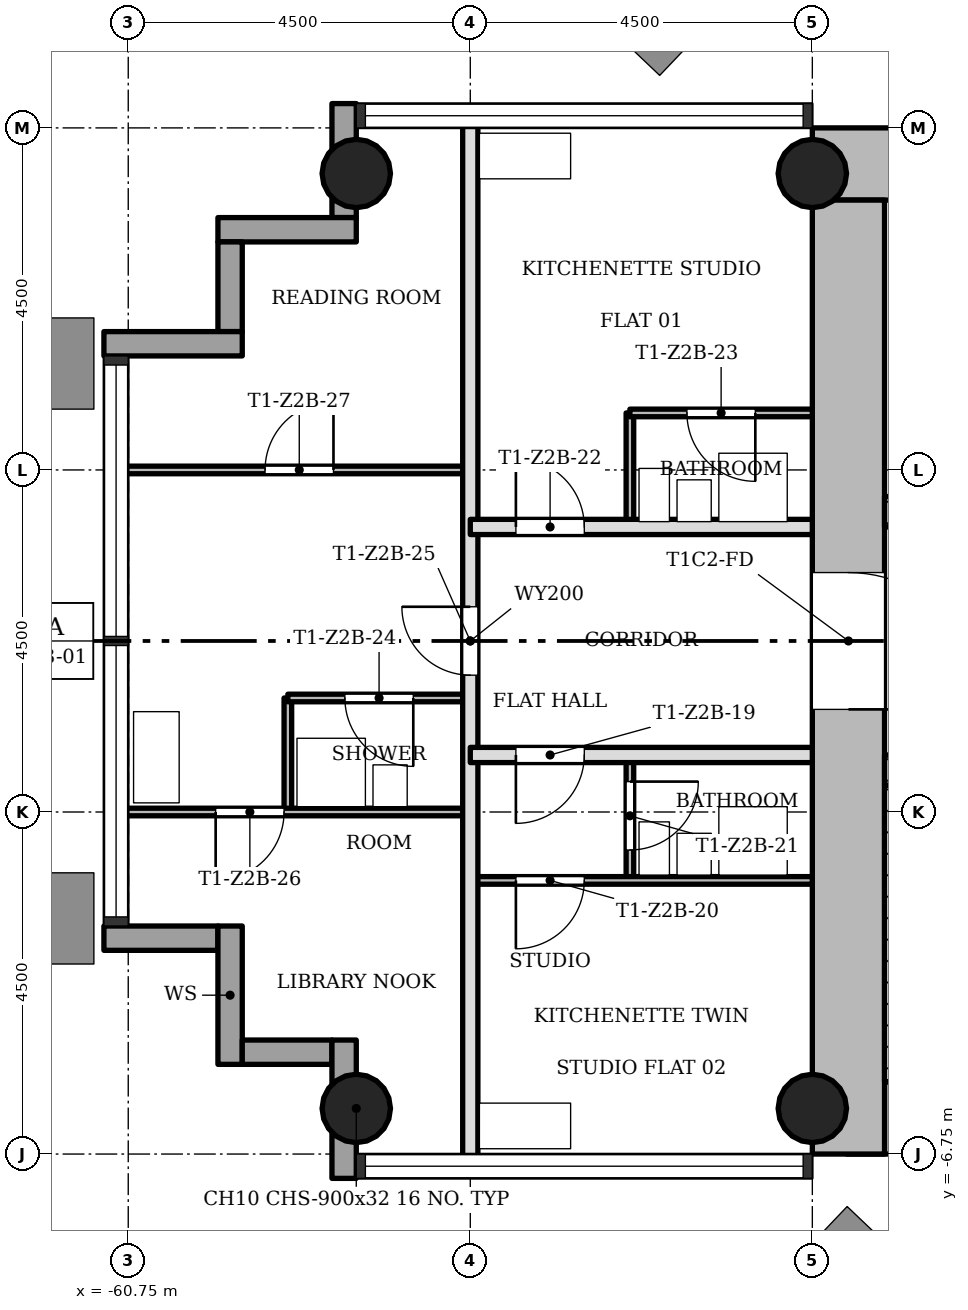
"""IFC4 building model, lengths in metres.
Left out: names, types, materials, properties, quantities, classifications, styles, units other than length and angle.
Written with IfcOpenShell. Run it as: python <this file> out.ifc"""

import sys

from ifc_helpers import new_model, si_unit, direction, frame, frame_2d, origin, origin_2d, place, context, subcontext, project, spatial, rectangle, hollow_circle, extrude, element, fill, save


model = new_model("IFC4")
c1 = context("Model", 3, precision=1e-05, world=origin(), true_north=direction((0.0, 1.0)))
c2 = subcontext(c1, "Body", "Model", "MODEL_VIEW")
j1 = project(units=[si_unit("LENGTHUNIT", "METRE"), si_unit("PLANEANGLEUNIT", "RADIAN")], contexts=[c1])
p1 = place(None, origin())
s1 = spatial("IfcSite", under=j1, at=p1, CompositionType="ELEMENT")
p2 = place(p1, origin())
s2 = spatial("IfcBuilding", under=s1, at=p2, CompositionType="ELEMENT")
p3 = place(p2, frame((0.0, 0.0, 80.0)))
s3 = spatial("IfcBuildingStorey", under=s2, at=p3, CompositionType="ELEMENT", Elevation=80.0)
p4 = place(p3, frame((-51.298, -6.275, 0.0), z_axis=(0.0, 0.0, 1.0), x_axis=(1.0, 0.0, 0.0)))
e1 = element("IfcWall", 1, at=p4, inside=s3, PredefinedType="SHEAR", context=c2, shape_type="SweptSolid", body=[
    extrude(rectangle(XDim=8.696, YDim=0.95, at=frame_2d((4.348, 0.0))), origin(), (0.0, 0.0, 1.0), 3.4),
])
p5 = place(p3, frame((-43.7, 6.275, 0.0), z_axis=(0.0, 0.0, 1.0), x_axis=(-1.0, 0.0, 0.0)))
e2 = element("IfcWall", 2, at=p5, inside=s3, PredefinedType="SHEAR", context=c2, shape_type="SweptSolid", body=[
    extrude(rectangle(XDim=8.05, YDim=0.95, at=frame_2d((4.025, 0.0))), origin(), (0.0, 0.0, 1.0), 3.4),
])
p6 = place(p3, frame((-51.275, 5.8, 0.0), z_axis=(0.0, 0.0, 1.0), x_axis=(0.0, -1.0, 0.0)))
e3 = element("IfcWall", 3, at=p6, inside=s3, PredefinedType="SHEAR", context=c2, shape_type="SweptSolid", body=[
    extrude(rectangle(XDim=12.55, YDim=0.95, at=frame_2d((6.275, 0.0))), origin(), (0.0, 0.0, 1.0), 3.4),
])
p7 = place(p6, frame((4.9, 0.0, 0.0)))
e4 = element("IfcOpeningElement", 4, at=p7, cuts=e3, PredefinedType="OPENING", context=c2, shape_type="SweptSolid", body=[
    extrude(rectangle(XDim=1.8, YDim=2.1, at=frame_2d((0.9, 1.05))), frame((0.0, 0.485, 0.0), z_axis=(0.0, -1.0, 0.0), x_axis=(1.0, 0.0, 0.0)), (0.0, 0.0, 1.0), 0.97),
])
p8 = place(p3, frame((-50.8, -1.7, 0.0), z_axis=(0.0, 0.0, 1.0), x_axis=(1.0, 0.0, 0.0)))
e5 = element("IfcWall", 5, at=p8, inside=s3, PredefinedType="SHEAR", context=c2, shape_type="SweptSolid", body=[
    extrude(rectangle(XDim=7.1, YDim=0.4, at=frame_2d((3.55, 0.0))), origin(), (0.0, 0.0, 1.0), 3.4),
])
p9 = place(p8, frame((5.5, 0.0, 0.0)))
e6 = element("IfcOpeningElement", 6, at=p9, cuts=e5, PredefinedType="OPENING", context=c2, shape_type="SweptSolid", body=[
    extrude(rectangle(XDim=0.9, YDim=2.1, at=frame_2d((0.45, 1.05))), frame((0.0, 0.21, 0.0), z_axis=(0.0, -1.0, 0.0), x_axis=(1.0, 0.0, 0.0)), (0.0, 0.0, 1.0), 0.42),
])
p10 = place(p3, frame((-50.8, 1.7, 0.0), z_axis=(0.0, 0.0, 1.0), x_axis=(1.0, 0.0, 0.0)))
e7 = element("IfcWall", 7, at=p10, inside=s3, PredefinedType="SHEAR", context=c2, shape_type="SweptSolid", body=[
    extrude(rectangle(XDim=7.1, YDim=0.4, at=frame_2d((3.55, 0.0))), origin(), (0.0, 0.0, 1.0), 3.4),
])
p11 = place(p10, frame((5.2, 0.0, 0.0)))
e8 = element("IfcOpeningElement", 8, at=p11, cuts=e7, PredefinedType="OPENING", context=c2, shape_type="SweptSolid", body=[
    extrude(rectangle(XDim=1.1, YDim=2.1, at=frame_2d((0.55, 1.05))), frame((0.0, 0.21, 0.0), z_axis=(0.0, -1.0, 0.0), x_axis=(1.0, 0.0, 0.0)), (0.0, 0.0, 1.0), 0.42),
])
for number, where, z_axis, x_axis in (
    (9, (-51.75, -6.15, 0.0), (0.0, 0.0, 1.0), (1.0, 0.0, 0.0)),
    (10, (-51.75, 6.15, 0.0), (0.0, 0.0, 1.0), (1.0, 0.0, 0.0)),
    (11, (-57.75, -6.15, 0.0), (0.0, 0.0, 1.0), (1.0, 0.0, 0.0)),
    (12, (-57.75, 6.15, 0.0), (0.0, 0.0, 1.0), (1.0, 0.0, 0.0)),
):
    element("IfcColumn", number, at=place(p3, frame(where, z_axis=z_axis, x_axis=x_axis)), inside=s3, PredefinedType="COLUMN", context=c2, shape_type="SweptSolid", body=[
        extrude(hollow_circle(Radius=0.45, WallThickness=0.032, at=origin_2d()), origin(), (0.0, 0.0, 1.0), 3.4),
    ])
p12 = place(p3, frame((-61.07, -3.91, -0.3), z_axis=(0.0, 0.0, 1.0), x_axis=(1.0, 0.0, 0.0)))
e13 = element("IfcWall", 13, at=p12, inside=s3, PredefinedType="STANDARD", context=c2, shape_type="SweptSolid", body=[
    extrude(rectangle(XDim=1.5, YDim=0.32, at=frame_2d((0.75, 0.0))), origin(), (0.0, 0.0, 1.0), 3.4),
])
p13 = place(p3, frame((-59.41, -3.75, -0.3), z_axis=(0.0, 0.0, 1.0), x_axis=(0.0, -1.0, 0.0)))
e14 = element("IfcWall", 14, at=p13, inside=s3, PredefinedType="STANDARD", context=c2, shape_type="SweptSolid", body=[
    extrude(rectangle(XDim=1.82, YDim=0.32, at=frame_2d((0.91, 0.0))), origin(), (0.0, 0.0, 1.0), 3.4),
])
p14 = place(p3, frame((-59.25, -5.41, -0.3), z_axis=(0.0, 0.0, 1.0), x_axis=(1.0, 0.0, 0.0)))
e15 = element("IfcWall", 15, at=p14, inside=s3, PredefinedType="STANDARD", context=c2, shape_type="SweptSolid", body=[
    extrude(rectangle(XDim=1.18, YDim=0.32, at=frame_2d((0.59, 0.0))), origin(), (0.0, 0.0, 1.0), 3.4),
])
p15 = place(p3, frame((-57.91, -5.25, -0.3), z_axis=(0.0, 0.0, 1.0), x_axis=(0.0, -1.0, 0.0)))
e16 = element("IfcWall", 16, at=p15, inside=s3, PredefinedType="STANDARD", context=c2, shape_type="SweptSolid", body=[
    extrude(rectangle(XDim=1.82, YDim=0.32, at=frame_2d((0.91, 0.0))), origin(), (0.0, 0.0, 1.0), 3.4),
])
p16 = place(p3, frame((-57.91, 7.07, -0.3), z_axis=(0.0, 0.0, 1.0), x_axis=(0.0, -1.0, 0.0)))
e17 = element("IfcWall", 17, at=p16, inside=s3, PredefinedType="STANDARD", context=c2, shape_type="SweptSolid", body=[
    extrude(rectangle(XDim=1.5, YDim=0.32, at=frame_2d((0.75, 0.0))), origin(), (0.0, 0.0, 1.0), 3.4),
])
p17 = place(p3, frame((-57.75, 5.41, -0.3), z_axis=(0.0, 0.0, 1.0), x_axis=(-1.0, 0.0, 0.0)))
e18 = element("IfcWall", 18, at=p17, inside=s3, PredefinedType="STANDARD", context=c2, shape_type="SweptSolid", body=[
    extrude(rectangle(XDim=1.82, YDim=0.32, at=frame_2d((0.91, 0.0))), origin(), (0.0, 0.0, 1.0), 3.4),
])
p18 = place(p3, frame((-59.41, 5.25, -0.3), z_axis=(0.0, 0.0, 1.0), x_axis=(0.0, -1.0, 0.0)))
e19 = element("IfcWall", 19, at=p18, inside=s3, PredefinedType="STANDARD", context=c2, shape_type="SweptSolid", body=[
    extrude(rectangle(XDim=1.18, YDim=0.32, at=frame_2d((0.59, 0.0))), origin(), (0.0, 0.0, 1.0), 3.4),
])
p19 = place(p3, frame((-59.25, 3.91, -0.3), z_axis=(0.0, 0.0, 1.0), x_axis=(-1.0, 0.0, 0.0)))
e20 = element("IfcWall", 20, at=p19, inside=s3, PredefinedType="STANDARD", context=c2, shape_type="SweptSolid", body=[
    extrude(rectangle(XDim=1.82, YDim=0.32, at=frame_2d((0.91, 0.0))), origin(), (0.0, 0.0, 1.0), 3.4),
])
p20 = place(p3, frame((-58.65, -2.25, 0.0), z_axis=(0.0, 0.0, 1.0), x_axis=(0.0, 1.0, 0.0)))
e21 = element("IfcWall", 21, at=p20, inside=s3, PredefinedType="PARTITIONING", context=c2, shape_type="SweptSolid", body=[
    extrude(rectangle(XDim=1.5, YDim=0.1, at=frame_2d((0.75, 0.0))), origin(), (0.0, 0.0, 1.0), 3.0),
])
p21 = place(p3, frame((-56.25, -6.85, 0.0), z_axis=(0.0, 0.0, 1.0), x_axis=(0.0, 1.0, 0.0)))
e22 = element("IfcWall", 22, at=p21, inside=s3, PredefinedType="SOLIDWALL", context=c2, shape_type="SweptSolid", body=[
    extrude(rectangle(XDim=13.7, YDim=0.2, at=frame_2d((6.85, 0.0))), origin(), (0.0, 0.0, 1.0), 3.0),
])
p22 = place(p21, frame((6.4, 0.0, 0.0)))
e23 = element("IfcOpeningElement", 23, at=p22, cuts=e22, PredefinedType="OPENING", context=c2, shape_type="SweptSolid", body=[
    extrude(rectangle(XDim=0.9, YDim=2.1, at=frame_2d((0.45, 1.05))), frame((0.0, 0.11, 0.0), z_axis=(0.0, -1.0, 0.0), x_axis=(1.0, 0.0, 0.0)), (0.0, 0.0, 1.0), 0.22),
])
p23 = place(p3, frame((-54.15, -3.15, 0.0), z_axis=(0.0, 0.0, 1.0), x_axis=(0.0, 1.0, 0.0)))
e24 = element("IfcWall", 24, at=p23, inside=s3, PredefinedType="PARTITIONING", context=c2, shape_type="SweptSolid", body=[
    extrude(rectangle(XDim=1.65, YDim=0.1, at=frame_2d((0.825, 0.0))), origin(), (0.0, 0.0, 1.0), 3.0),
])
p24 = place(p23, frame((0.4, 0.0, 0.0)))
e25 = element("IfcOpeningElement", 25, at=p24, cuts=e24, PredefinedType="OPENING", context=c2, shape_type="SweptSolid", body=[
    extrude(rectangle(XDim=0.9, YDim=2.1, at=frame_2d((0.45, 1.05))), frame((0.0, 0.06, 0.0), z_axis=(0.0, -1.0, 0.0), x_axis=(1.0, 0.0, 0.0)), (0.0, 0.0, 1.0), 0.12),
])
p25 = place(p3, frame((-54.15, 1.5, 0.0), z_axis=(0.0, 0.0, 1.0), x_axis=(0.0, 1.0, 0.0)))
e26 = element("IfcWall", 26, at=p25, inside=s3, PredefinedType="PARTITIONING", context=c2, shape_type="SweptSolid", body=[
    extrude(rectangle(XDim=1.5, YDim=0.1, at=frame_2d((0.75, 0.0))), origin(), (0.0, 0.0, 1.0), 3.0),
])
p26 = place(p3, frame((-56.25, -3.15, 0.0), z_axis=(0.0, 0.0, 1.0), x_axis=(1.0, 0.0, 0.0)))
e27 = element("IfcWall", 27, at=p26, inside=s3, PredefinedType="PARTITIONING", context=c2, shape_type="SweptSolid", body=[
    extrude(rectangle(XDim=4.5, YDim=0.1, at=frame_2d((2.25, 0.0))), origin(), (0.0, 0.0, 1.0), 3.0),
])
p27 = place(p26, frame((0.6, 0.0, 0.0)))
e28 = element("IfcOpeningElement", 28, at=p27, cuts=e27, PredefinedType="OPENING", context=c2, shape_type="SweptSolid", body=[
    extrude(rectangle(XDim=0.9, YDim=2.1, at=frame_2d((0.45, 1.05))), frame((0.0, 0.06, 0.0), z_axis=(0.0, -1.0, 0.0), x_axis=(1.0, 0.0, 0.0)), (0.0, 0.0, 1.0), 0.12),
])
p28 = place(p3, frame((-60.85, -2.25, 0.0), z_axis=(0.0, 0.0, 1.0), x_axis=(1.0, 0.0, 0.0)))
e29 = element("IfcWall", 29, at=p28, inside=s3, PredefinedType="PARTITIONING", context=c2, shape_type="SweptSolid", body=[
    extrude(rectangle(XDim=4.6, YDim=0.1, at=frame_2d((2.3, 0.0))), origin(), (0.0, 0.0, 1.0), 3.0),
])
p29 = place(p28, frame((1.25, 0.0, 0.0)))
e30 = element("IfcOpeningElement", 30, at=p29, cuts=e29, PredefinedType="OPENING", context=c2, shape_type="SweptSolid", body=[
    extrude(rectangle(XDim=0.9, YDim=2.1, at=frame_2d((0.45, 1.05))), frame((0.0, 0.06, 0.0), z_axis=(0.0, -1.0, 0.0), x_axis=(1.0, 0.0, 0.0)), (0.0, 0.0, 1.0), 0.12),
])
p30 = place(p3, frame((-56.25, -1.5, 0.0), z_axis=(0.0, 0.0, 1.0), x_axis=(1.0, 0.0, 0.0)))
e31 = element("IfcWall", 31, at=p30, inside=s3, PredefinedType="SOLIDWALL", context=c2, shape_type="SweptSolid", body=[
    extrude(rectangle(XDim=4.5, YDim=0.2, at=frame_2d((2.25, 0.0))), origin(), (0.0, 0.0, 1.0), 3.0),
])
p31 = place(p30, frame((0.6, 0.0, 0.0)))
e32 = element("IfcOpeningElement", 32, at=p31, cuts=e31, PredefinedType="OPENING", context=c2, shape_type="SweptSolid", body=[
    extrude(rectangle(XDim=0.9, YDim=2.1, at=frame_2d((0.45, 1.05))), frame((0.0, 0.11, 0.0), z_axis=(0.0, -1.0, 0.0), x_axis=(1.0, 0.0, 0.0)), (0.0, 0.0, 1.0), 0.22),
])
p32 = place(p3, frame((-58.65, -0.75, 0.0), z_axis=(0.0, 0.0, 1.0), x_axis=(1.0, 0.0, 0.0)))
e33 = element("IfcWall", 33, at=p32, inside=s3, PredefinedType="PARTITIONING", context=c2, shape_type="SweptSolid", body=[
    extrude(rectangle(XDim=2.4, YDim=0.1, at=frame_2d((1.2, 0.0))), origin(), (0.0, 0.0, 1.0), 3.0),
])
p33 = place(p32, frame((0.75, 0.0, 0.0)))
e34 = element("IfcOpeningElement", 34, at=p33, cuts=e33, PredefinedType="OPENING", context=c2, shape_type="SweptSolid", body=[
    extrude(rectangle(XDim=0.9, YDim=2.1, at=frame_2d((0.45, 1.05))), frame((0.0, 0.06, 0.0), z_axis=(0.0, -1.0, 0.0), x_axis=(1.0, 0.0, 0.0)), (0.0, 0.0, 1.0), 0.12),
])
p34 = place(p3, frame((-56.25, 1.5, 0.0), z_axis=(0.0, 0.0, 1.0), x_axis=(1.0, 0.0, 0.0)))
e35 = element("IfcWall", 35, at=p34, inside=s3, PredefinedType="SOLIDWALL", context=c2, shape_type="SweptSolid", body=[
    extrude(rectangle(XDim=4.5, YDim=0.2, at=frame_2d((2.25, 0.0))), origin(), (0.0, 0.0, 1.0), 3.0),
])
p35 = place(p34, frame((0.6, 0.0, 0.0)))
e36 = element("IfcOpeningElement", 36, at=p35, cuts=e35, PredefinedType="OPENING", context=c2, shape_type="SweptSolid", body=[
    extrude(rectangle(XDim=0.9, YDim=2.1, at=frame_2d((0.45, 1.05))), frame((0.0, 0.11, 0.0), z_axis=(0.0, -1.0, 0.0), x_axis=(1.0, 0.0, 0.0)), (0.0, 0.0, 1.0), 0.22),
])
p36 = place(p3, frame((-60.85, 2.25, 0.0), z_axis=(0.0, 0.0, 1.0), x_axis=(1.0, 0.0, 0.0)))
e37 = element("IfcWall", 37, at=p36, inside=s3, PredefinedType="PARTITIONING", context=c2, shape_type="SweptSolid", body=[
    extrude(rectangle(XDim=4.6, YDim=0.1, at=frame_2d((2.3, 0.0))), origin(), (0.0, 0.0, 1.0), 3.0),
])
p37 = place(p36, frame((1.9, 0.0, 0.0)))
e38 = element("IfcOpeningElement", 38, at=p37, cuts=e37, PredefinedType="OPENING", context=c2, shape_type="SweptSolid", body=[
    extrude(rectangle(XDim=0.9, YDim=2.1, at=frame_2d((0.45, 1.05))), frame((0.0, 0.06, 0.0), z_axis=(0.0, -1.0, 0.0), x_axis=(1.0, 0.0, 0.0)), (0.0, 0.0, 1.0), 0.12),
])
p38 = place(p3, frame((-54.15, 3.0, 0.0), z_axis=(0.0, 0.0, 1.0), x_axis=(1.0, 0.0, 0.0)))
e39 = element("IfcWall", 39, at=p38, inside=s3, PredefinedType="PARTITIONING", context=c2, shape_type="SweptSolid", body=[
    extrude(rectangle(XDim=2.4, YDim=0.1, at=frame_2d((1.2, 0.0))), origin(), (0.0, 0.0, 1.0), 3.0),
])
p39 = place(p38, frame((0.75, 0.0, 0.0)))
e40 = element("IfcOpeningElement", 40, at=p39, cuts=e39, PredefinedType="OPENING", context=c2, shape_type="SweptSolid", body=[
    extrude(rectangle(XDim=0.9, YDim=2.1, at=frame_2d((0.45, 1.05))), frame((0.0, 0.06, 0.0), z_axis=(0.0, -1.0, 0.0), x_axis=(1.0, 0.0, 0.0)), (0.0, 0.0, 1.0), 0.12),
])
p40 = place(p3, frame((-50.675, -1.9, 0.0), z_axis=(0.0, 0.0, 1.0), x_axis=(0.0, -1.0, 0.0)))
e41 = element("IfcWall", 41, at=p40, inside=s3, PredefinedType="SHEAR", context=c2, shape_type="SweptSolid", body=[
    extrude(rectangle(XDim=3.9, YDim=0.25, at=frame_2d((1.95, 0.0))), origin(), (0.0, 0.0, 1.0), 3.4),
])
p41 = place(p31, origin())
e42 = element("IfcDoor", 42, at=p41, inside=s3, OperationType="SINGLE_SWING_LEFT", PredefinedType="DOOR", context=c2, shape_type="SweptSolid", body=[
    extrude(rectangle(XDim=0.9, YDim=2.1, at=frame_2d((0.45, 1.05))), frame((0.0, 0.025, 0.0), z_axis=(0.0, -1.0, 0.0), x_axis=(1.0, 0.0, 0.0)), (0.0, 0.0, 1.0), 0.05),
])
fill(e32, e42)
p42 = place(p27, origin())
e43 = element("IfcDoor", 43, at=p42, inside=s3, OperationType="SINGLE_SWING_LEFT", PredefinedType="DOOR", context=c2, shape_type="SweptSolid", body=[
    extrude(rectangle(XDim=0.9, YDim=2.1, at=frame_2d((0.45, 1.05))), frame((0.0, 0.025, 0.0), z_axis=(0.0, -1.0, 0.0), x_axis=(1.0, 0.0, 0.0)), (0.0, 0.0, 1.0), 0.05),
])
fill(e28, e43)
p43 = place(p24, origin())
e44 = element("IfcDoor", 44, at=p43, inside=s3, OperationType="SINGLE_SWING_RIGHT", PredefinedType="DOOR", context=c2, shape_type="SweptSolid", body=[
    extrude(rectangle(XDim=0.9, YDim=2.1, at=frame_2d((0.45, 1.05))), frame((0.0, 0.025, 0.0), z_axis=(0.0, -1.0, 0.0), x_axis=(1.0, 0.0, 0.0)), (0.0, 0.0, 1.0), 0.05),
])
fill(e25, e44)
p44 = place(p35, origin())
e45 = element("IfcDoor", 45, at=p44, inside=s3, OperationType="SINGLE_SWING_RIGHT", PredefinedType="DOOR", context=c2, shape_type="SweptSolid", body=[
    extrude(rectangle(XDim=0.9, YDim=2.1, at=frame_2d((0.45, 1.05))), frame((0.0, 0.025, 0.0), z_axis=(0.0, -1.0, 0.0), x_axis=(1.0, 0.0, 0.0)), (0.0, 0.0, 1.0), 0.05),
])
fill(e36, e45)
p45 = place(p39, origin())
e46 = element("IfcDoor", 46, at=p45, inside=s3, OperationType="SINGLE_SWING_RIGHT", PredefinedType="DOOR", context=c2, shape_type="SweptSolid", body=[
    extrude(rectangle(XDim=0.9, YDim=2.1, at=frame_2d((0.45, 1.05))), frame((0.0, 0.025, 0.0), z_axis=(0.0, -1.0, 0.0), x_axis=(1.0, 0.0, 0.0)), (0.0, 0.0, 1.0), 0.05),
])
fill(e40, e46)
p46 = place(p33, origin())
e47 = element("IfcDoor", 47, at=p46, inside=s3, OperationType="SINGLE_SWING_RIGHT", PredefinedType="DOOR", context=c2, shape_type="SweptSolid", body=[
    extrude(rectangle(XDim=0.9, YDim=2.1, at=frame_2d((0.45, 1.05))), frame((0.0, 0.025, 0.0), z_axis=(0.0, -1.0, 0.0), x_axis=(1.0, 0.0, 0.0)), (0.0, 0.0, 1.0), 0.05),
])
fill(e34, e47)
p47 = place(p22, origin())
e48 = element("IfcDoor", 48, at=p47, inside=s3, OperationType="SINGLE_SWING_LEFT", PredefinedType="DOOR", context=c2, shape_type="SweptSolid", body=[
    extrude(rectangle(XDim=0.9, YDim=2.1, at=frame_2d((0.45, 1.05))), frame((0.0, 0.025, 0.0), z_axis=(0.0, -1.0, 0.0), x_axis=(1.0, 0.0, 0.0)), (0.0, 0.0, 1.0), 0.05),
])
fill(e23, e48)
p48 = place(p29, origin())
e49 = element("IfcDoor", 49, at=p48, inside=s3, OperationType="SINGLE_SWING_LEFT", PredefinedType="DOOR", context=c2, shape_type="SweptSolid", body=[
    extrude(rectangle(XDim=0.9, YDim=2.1, at=frame_2d((0.45, 1.05))), frame((0.0, 0.025, 0.0), z_axis=(0.0, -1.0, 0.0), x_axis=(1.0, 0.0, 0.0)), (0.0, 0.0, 1.0), 0.05),
])
fill(e30, e49)
p49 = place(p37, origin())
e50 = element("IfcDoor", 50, at=p49, inside=s3, OperationType="SINGLE_SWING_LEFT", PredefinedType="DOOR", context=c2, shape_type="SweptSolid", body=[
    extrude(rectangle(XDim=0.9, YDim=2.1, at=frame_2d((0.45, 1.05))), frame((0.0, 0.025, 0.0), z_axis=(0.0, -1.0, 0.0), x_axis=(1.0, 0.0, 0.0)), (0.0, 0.0, 1.0), 0.05),
])
fill(e38, e50)
p50 = place(p7, origin())
e51 = element("IfcDoor", 51, at=p50, inside=s3, OperationType="SINGLE_SWING_LEFT", PredefinedType="DOOR", context=c2, shape_type="SweptSolid", body=[
    extrude(rectangle(XDim=1.8, YDim=2.1, at=frame_2d((0.9, 1.05))), frame((0.0, 0.025, 0.0), z_axis=(0.0, -1.0, 0.0), x_axis=(1.0, 0.0, 0.0)), (0.0, 0.0, 1.0), 0.05),
])
fill(e4, e51)
save(model, sys.argv[1])
